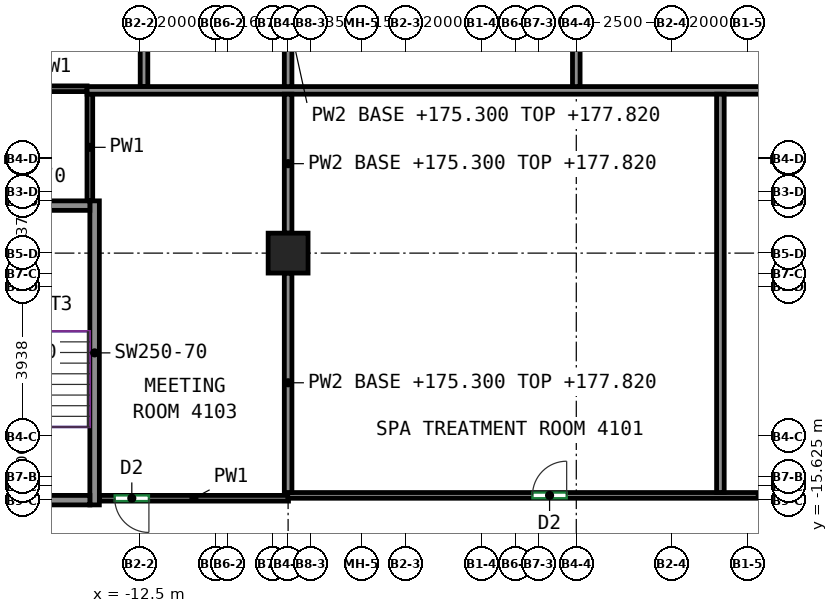
"""IFC4 building model, lengths in metres.
Left out: names, types, materials, properties, quantities, classifications, styles, units other than length and angle.
Written with IfcOpenShell. Run it as: python <this file> out.ifc"""

import sys

from ifc_helpers import new_model, si_unit, direction, frame, frame_2d, origin, origin_2d, place, context, subcontext, project, spatial, rectangle, extrude, source, transform, mapped, element, fill, save


model = new_model("IFC4")
c1 = context("Model", 3, precision=1e-05, world=origin(), true_north=direction((0.0, 1.0)))
c2 = subcontext(c1, "Body", "Model", "MODEL_VIEW")
j1 = project(units=[si_unit("LENGTHUNIT", "METRE"), si_unit("PLANEANGLEUNIT", "RADIAN")], contexts=[c1])
p1 = place(None, origin())
s1 = spatial("IfcSite", under=j1, at=p1, CompositionType="ELEMENT")
p2 = place(p1, origin())
s2 = spatial("IfcBuilding", under=s1, at=p2, CompositionType="ELEMENT")
p3 = place(p2, frame((0.0, 0.0, 175.3)))
s3 = spatial("IfcBuildingStorey", under=s2, at=p3, CompositionType="ELEMENT", Elevation=175.3)
m1 = source(origin(), c2, "Body", "SweptSolid", [
    extrude(rectangle(XDim=1.05, YDim=1.05, at=origin_2d()), origin(), (0.0, 0.0, 1.0), 3.12),
])
p4 = place(p3, frame((-8.583, -9.125, 0.0), z_axis=(0.0, 0.0, 1.0), x_axis=(1.0, 0.0, 0.0)))
e1 = element("IfcColumn", 1, at=p4, inside=s3, PredefinedType="COLUMN", context=c2, shape_type="MappedRepresentation", body=[
    mapped(m1, transform((0.0, 0.0, 0.0))),
])
m2 = source(origin(), c2, "Body", "SweptSolid", [
    extrude(rectangle(XDim=8.0, YDim=0.25, at=frame_2d((4.0, 0.0))), origin(), (0.0, 0.0, 1.0), 3.12),
])
p5 = place(p3, frame((-13.675, -15.75, 0.0), z_axis=(0.0, 0.0, 1.0), x_axis=(0.0, 1.0, 0.0)))
e2 = element("IfcWall", 2, at=p5, inside=s3, PredefinedType="SHEAR", context=c2, shape_type="MappedRepresentation", body=[
    mapped(m2, transform((0.0, 0.0, 0.0))),
])
m3 = source(origin(), c2, "Body", "SweptSolid", [
    extrude(rectangle(XDim=3.7, YDim=0.25, at=frame_2d((1.85, 0.0))), origin(), (0.0, 0.0, 1.0), 3.12),
])
p6 = place(p3, frame((-17.5, -15.625, 0.0), z_axis=(0.0, 0.0, 1.0), x_axis=(1.0, 0.0, 0.0)))
e3 = element("IfcWall", 3, at=p6, inside=s3, PredefinedType="SHEAR", context=c2, shape_type="MappedRepresentation", body=[
    mapped(m3, transform((0.0, 0.0, 0.0))),
])
p7 = place(p6, frame((1.25, 0.0, 0.0)))
e4 = element("IfcOpeningElement", 4, at=p7, cuts=e3, PredefinedType="OPENING", context=c2, shape_type="SweptSolid", body=[
    extrude(rectangle(XDim=1.2, YDim=2.1, at=frame_2d((0.6, 1.05))), frame((0.0, 0.135, 0.0), z_axis=(0.0, -1.0, 0.0), x_axis=(1.0, 0.0, 0.0)), (0.0, 0.0, 1.0), 0.27),
])
p8 = place(p3, frame((-17.5, -7.875, 0.0), z_axis=(0.0, 0.0, 1.0), x_axis=(1.0, 0.0, 0.0)))
e5 = element("IfcWall", 5, at=p8, inside=s3, PredefinedType="SHEAR", context=c2, shape_type="MappedRepresentation", body=[
    mapped(m3, transform((0.0, 0.0, 0.0))),
])
p9 = place(p3, frame((-17.575, -4.8, 0.0), z_axis=(0.0, 0.0, 1.0), x_axis=(1.0, 0.0, 0.0)))
e6 = element("IfcWall", 6, at=p9, inside=s3, PredefinedType="PARTITIONING", context=c2, shape_type="SweptSolid", body=[
    extrude(rectangle(XDim=3.702, YDim=0.15, at=frame_2d((1.851, 0.0))), origin(), (0.0, 0.0, 1.0), 3.12),
])
p10 = place(p3, frame((-13.8, -7.75, 0.0), z_axis=(0.0, 0.0, 1.0), x_axis=(0.0, 1.0, 0.0)))
e7 = element("IfcWall", 7, at=p10, inside=s3, PredefinedType="PARTITIONING", context=c2, shape_type="SweptSolid", body=[
    extrude(rectangle(XDim=2.817, YDim=0.15, at=frame_2d((1.408, 0.0))), origin(), (0.0, 0.0, 1.0), 3.12),
])
p11 = place(p3, frame((-8.573, -15.575, 0.0), z_axis=(0.0, 0.0, 1.0), x_axis=(-1.0, 0.0, 0.0)))
e8 = element("IfcWall", 8, at=p11, inside=s3, PredefinedType="PARTITIONING", context=c2, shape_type="SweptSolid", body=[
    extrude(rectangle(XDim=4.977, YDim=0.15, at=frame_2d((2.489, 0.0))), origin(), (0.0, 0.0, 1.0), 3.12),
])
p12 = place(p11, frame((3.673, 0.0, 0.0)))
e9 = element("IfcOpeningElement", 9, at=p12, cuts=e8, PredefinedType="OPENING", context=c2, shape_type="SweptSolid", body=[
    extrude(rectangle(XDim=0.9, YDim=2.1, at=frame_2d((0.45, 1.05))), frame((0.0, 0.085, 0.0), z_axis=(0.0, -1.0, 0.0), x_axis=(1.0, 0.0, 0.0)), (0.0, 0.0, 1.0), 0.17),
])
p13 = place(p3, frame((-8.593, -15.5, 0.0), z_axis=(0.0, 0.0, 1.0), x_axis=(1.0, 0.0, 0.0)))
e10 = element("IfcWall", 10, at=p13, inside=s3, PredefinedType="PARTITIONING", context=c2, shape_type="SweptSolid", body=[
    extrude(rectangle(XDim=24.868, YDim=0.15, at=frame_2d((12.434, 0.0))), origin(), (0.0, 0.0, 1.0), 3.12),
])
p14 = place(p13, frame((6.44, 0.0, 0.0)))
e11 = element("IfcOpeningElement", 11, at=p14, cuts=e10, PredefinedType="OPENING", context=c2, shape_type="SweptSolid", body=[
    extrude(rectangle(XDim=0.9, YDim=2.1, at=frame_2d((0.45, 1.05))), frame((0.0, 0.085, 0.0), z_axis=(0.0, -1.0, 0.0), x_axis=(1.0, 0.0, 0.0)), (0.0, 0.0, 1.0), 0.17),
])
p15 = place(p13, frame((16.43, 0.0, 0.0)))
e12 = element("IfcOpeningElement", 12, at=p15, cuts=e10, PredefinedType="OPENING", context=c2, shape_type="SweptSolid", body=[
    extrude(rectangle(XDim=0.9, YDim=2.1, at=frame_2d((0.45, 1.05))), frame((0.0, 0.085, 0.0), z_axis=(0.0, -1.0, 0.0), x_axis=(1.0, 0.0, 0.0)), (0.0, 0.0, 1.0), 0.17),
])
p16 = place(p3, frame((-12.375, -4.743, 0.0), z_axis=(0.0, 0.0, 1.0), x_axis=(0.0, 1.0, 0.0)))
e13 = element("IfcWall", 13, at=p16, inside=s3, PredefinedType="PARTITIONING", context=c2, shape_type="SweptSolid", body=[
    extrude(rectangle(XDim=8.366, YDim=0.2, at=frame_2d((4.183, 0.0))), origin(), (0.0, 0.0, 1.0), 3.12),
])
p17 = place(p3, frame((-13.873, -4.843, 0.0), z_axis=(0.0, 0.0, 1.0), x_axis=(1.0, 0.0, 0.0)))
e14 = element("IfcWall", 14, at=p17, inside=s3, PredefinedType="PARTITIONING", context=c2, shape_type="SweptSolid", body=[
    extrude(rectangle(XDim=30.146, YDim=0.2, at=frame_2d((15.073, 0.0))), origin(), (0.0, 0.0, 1.0), 3.12),
])
p18 = place(p3, frame((-8.583, -4.743, 0.0), z_axis=(0.0, 0.0, 1.0), x_axis=(0.0, 1.0, 0.0)))
e15 = element("IfcWall", 15, at=p18, inside=s3, PredefinedType="PARTITIONING", context=c2, shape_type="SweptSolid", body=[
    extrude(rectangle(XDim=3.656, YDim=0.2, at=frame_2d((1.828, 0.0))), origin(), (0.0, 0.0, 1.0), 2.52),
])
p19 = place(p3, frame((-1.0, -4.743, 0.0), z_axis=(0.0, 0.0, 1.0), x_axis=(0.0, 1.0, 0.0)))
e16 = element("IfcWall", 16, at=p19, inside=s3, PredefinedType="PARTITIONING", context=c2, shape_type="SweptSolid", body=[
    extrude(rectangle(XDim=8.366, YDim=0.2, at=frame_2d((4.183, 0.0))), origin(), (0.0, 0.0, 1.0), 3.12),
])
p20 = place(p3, frame((-8.583, -8.6, 0.0), z_axis=(0.0, 0.0, 1.0), x_axis=(0.0, 1.0, 0.0)))
e17 = element("IfcWall", 17, at=p20, inside=s3, PredefinedType="PARTITIONING", context=c2, shape_type="SweptSolid", body=[
    extrude(rectangle(XDim=3.657, YDim=0.2, at=frame_2d((1.829, 0.0))), origin(), (0.0, 0.0, 1.0), 2.52),
])
p21 = place(p3, frame((-8.583, -15.423, 0.0), z_axis=(0.0, 0.0, 1.0), x_axis=(0.0, 1.0, 0.0)))
e18 = element("IfcWall", 18, at=p21, inside=s3, PredefinedType="PARTITIONING", context=c2, shape_type="SweptSolid", body=[
    extrude(rectangle(XDim=5.773, YDim=0.2, at=frame_2d((2.887, 0.0))), origin(), (0.0, 0.0, 1.0), 2.52),
])
p22 = place(p3, frame((2.792, -15.423, 0.0), z_axis=(0.0, 0.0, 1.0), x_axis=(0.0, 1.0, 0.0)))
e19 = element("IfcWall", 19, at=p22, inside=s3, PredefinedType="PARTITIONING", context=c2, shape_type="SweptSolid", body=[
    extrude(rectangle(XDim=10.48, YDim=0.2, at=frame_2d((5.24, 0.0))), origin(), (0.0, 0.0, 1.0), 3.12),
])
p23 = place(p12, origin())
e20 = element("IfcDoor", 20, at=p23, inside=s3, OperationType="SINGLE_SWING_LEFT", PredefinedType="DOOR", context=c2, shape_type="SweptSolid", body=[
    extrude(rectangle(XDim=0.9, YDim=2.1, at=frame_2d((0.45, 1.05))), frame((0.0, 0.025, 0.0), z_axis=(0.0, -1.0, 0.0), x_axis=(1.0, 0.0, 0.0)), (0.0, 0.0, 1.0), 0.05),
])
fill(e9, e20)
p24 = place(p14, origin())
e21 = element("IfcDoor", 21, at=p24, inside=s3, OperationType="SINGLE_SWING_RIGHT", PredefinedType="DOOR", context=c2, shape_type="SweptSolid", body=[
    extrude(rectangle(XDim=0.9, YDim=2.1, at=frame_2d((0.45, 1.05))), frame((0.0, 0.025, 0.0), z_axis=(0.0, -1.0, 0.0), x_axis=(1.0, 0.0, 0.0)), (0.0, 0.0, 1.0), 0.05),
])
fill(e11, e21)
save(model, sys.argv[1])
